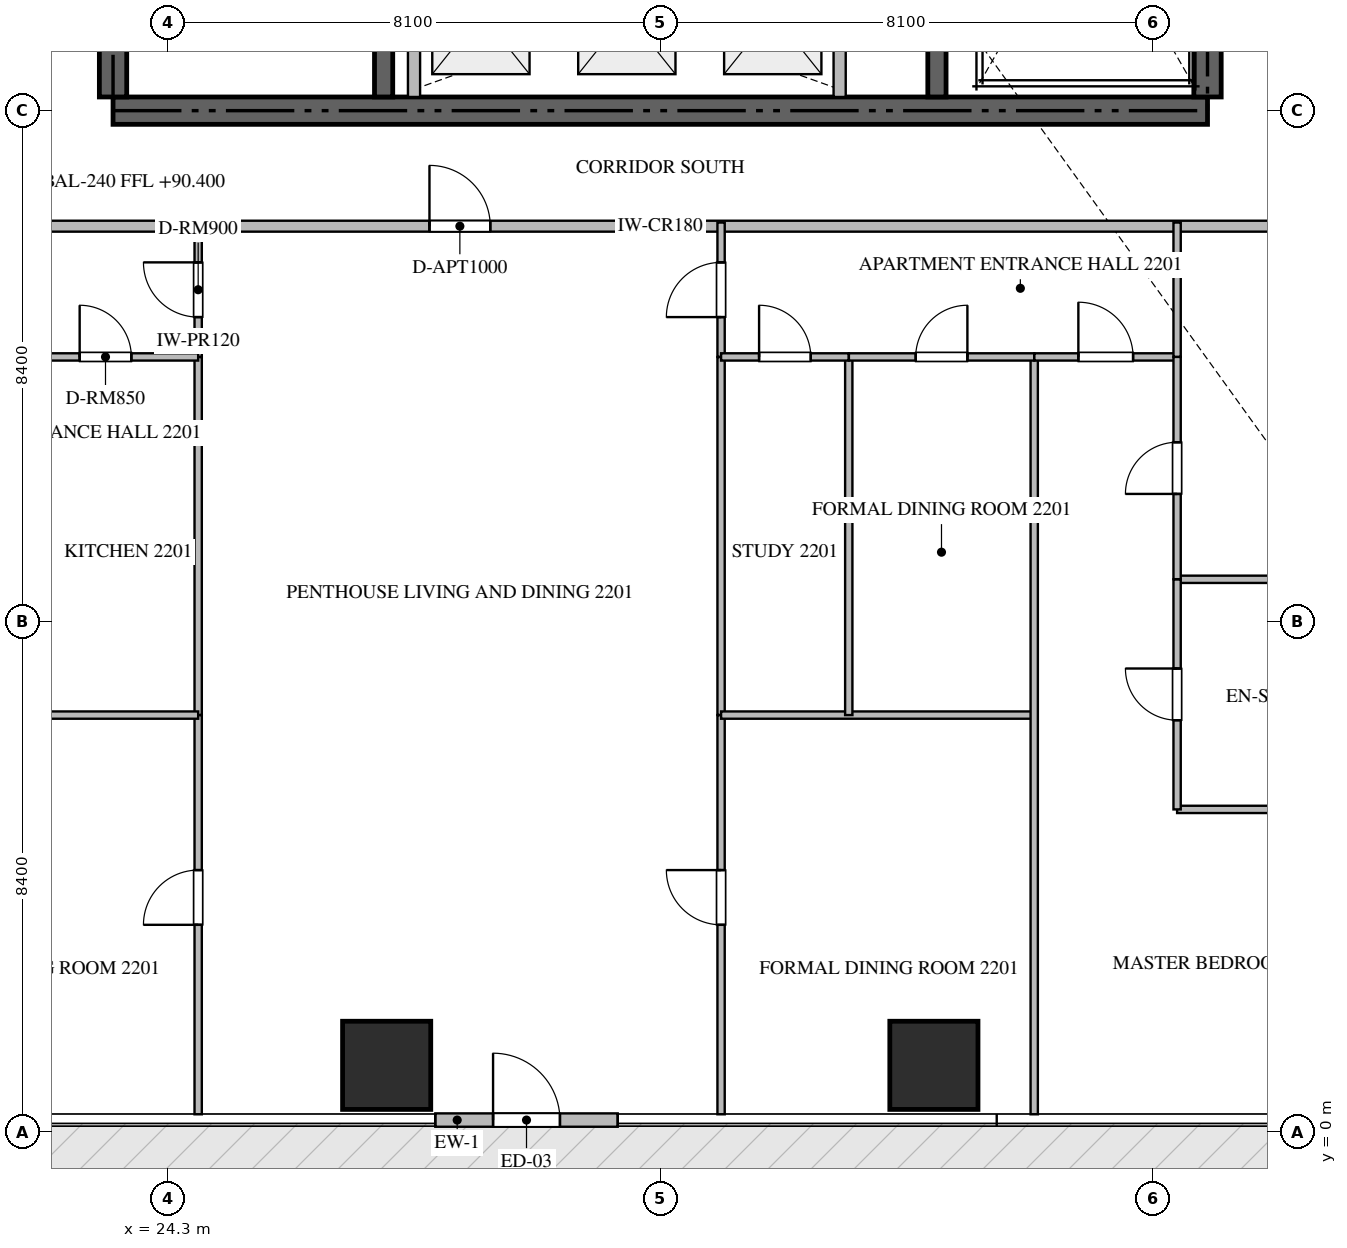
"""IFC4 building model, lengths in metres.
Left out: names, types, materials, properties, quantities, classifications, styles, units other than length and angle.
Written with IfcOpenShell. Run it as: python <this file> out.ifc"""

import sys

from ifc_helpers import new_model, si_unit, direction, frame, frame_2d, origin, origin_2d, place, context, subcontext, project, spatial, rectangle, extrude, source, transform, mapped, element, fill, save


model = new_model("IFC4")
c1 = context("Model", 3, precision=1e-05, world=origin(), true_north=direction((0.0, 1.0)))
c2 = subcontext(c1, "Body", "Model", "MODEL_VIEW")
j1 = project(units=[si_unit("LENGTHUNIT", "METRE"), si_unit("PLANEANGLEUNIT", "RADIAN")], contexts=[c1])
p1 = place(None, origin())
s1 = spatial("IfcSite", under=j1, at=p1, CompositionType="ELEMENT")
p2 = place(p1, origin())
s2 = spatial("IfcBuilding", under=s1, at=p2, CompositionType="ELEMENT")
p3 = place(p2, frame((0.0, 0.0, 90.45)))
s3 = spatial("IfcBuildingStorey", under=s2, at=p3, CompositionType="ELEMENT", Elevation=90.45)
p4 = place(p3, frame((23.4, 16.8, -0.26), z_axis=(0.0, 0.0, 1.0), x_axis=(1.0, 0.0, 0.0)))
e1 = element("IfcWall", 1, at=p4, inside=s3, PredefinedType="SHEAR", context=c2, shape_type="SweptSolid", body=[
    extrude(rectangle(XDim=18.0, YDim=0.45, at=frame_2d((9.0, 0.0))), origin(), (0.0, 0.0, 1.0), 3.748),
])
p5 = place(p3, frame((23.4, 17.025, -0.26), z_axis=(0.0, 0.0, 1.0), x_axis=(0.0, 1.0, 0.0)))
e2 = element("IfcWall", 2, at=p5, inside=s3, PredefinedType="SHEAR", context=c2, shape_type="SweptSolid", body=[
    extrude(rectangle(XDim=4.825, YDim=0.45, at=frame_2d((2.413, 0.0))), origin(), (0.0, 0.0, 1.0), 3.748),
])
p6 = place(p3, frame((41.4, 17.025, -0.26), z_axis=(0.0, 0.0, 1.0), x_axis=(0.0, 1.0, 0.0)))
e3 = element("IfcWall", 3, at=p6, inside=s3, PredefinedType="SHEAR", context=c2, shape_type="SweptSolid", body=[
    extrude(rectangle(XDim=8.325, YDim=0.45, at=frame_2d((4.163, 0.0))), origin(), (0.0, 0.0, 1.0), 3.748),
])
p7 = place(p3, frame((27.85, 17.025, -0.26), z_axis=(0.0, 0.0, 1.0), x_axis=(0.0, 1.0, 0.0)))
e4 = element("IfcWall", 4, at=p7, inside=s3, PredefinedType="SHEAR", context=c2, shape_type="SweptSolid", body=[
    extrude(rectangle(XDim=4.825, YDim=0.3, at=frame_2d((2.413, 0.0))), origin(), (0.0, 0.0, 1.0), 3.748),
])
p8 = place(p3, frame((36.95, 17.025, -0.26), z_axis=(0.0, 0.0, 1.0), x_axis=(0.0, 1.0, 0.0)))
e5 = element("IfcWall", 5, at=p8, inside=s3, PredefinedType="SHEAR", context=c2, shape_type="SweptSolid", body=[
    extrude(rectangle(XDim=8.325, YDim=0.3, at=frame_2d((4.163, 0.0))), origin(), (0.0, 0.0, 1.0), 3.748),
])
m1 = source(origin(), c2, "Body", "SweptSolid", [
    extrude(rectangle(XDim=1.45, YDim=1.45, at=origin_2d()), origin(), (0.0, 0.0, 1.0), 3.75),
])
for number, where, z_axis, x_axis in (
    (6, (27.9, 1.1, -0.26), (0.0, 0.0, 1.0), (1.0, 0.0, 0.0)),
    (7, (36.9, 1.1, -0.26), (0.0, 0.0, 1.0), (1.0, 0.0, 0.0)),
):
    element("IfcColumn", number, at=place(p3, frame(where, z_axis=z_axis, x_axis=x_axis)), inside=s3, PredefinedType="COLUMN", context=c2, shape_type="MappedRepresentation", body=[
        mapped(m1, transform((0.0, 0.0, 0.0), scale=1.0)),
    ])
p9 = place(p3, frame((28.7, 0.2, 0.0), z_axis=(0.0, 0.0, 1.0), x_axis=(1.0, 0.0, 0.0)))
e8 = element("IfcWall", 8, at=p9, inside=s3, PredefinedType="ELEMENTEDWALL", context=c2, shape_type="SweptSolid", body=[
    extrude(rectangle(XDim=3.0, YDim=0.22, at=frame_2d((1.5, 0.0))), origin(), (0.0, 0.0, 1.0), 3.475),
])
p10 = place(p9, frame((0.95, 0.0, 0.0)))
e9 = element("IfcOpeningElement", 9, at=p10, cuts=e8, PredefinedType="OPENING", context=c2, shape_type="SweptSolid", body=[
    extrude(rectangle(XDim=1.1, YDim=2.2, at=frame_2d((0.55, 1.1))), frame((0.0, 0.12, 0.0), z_axis=(0.0, -1.0, 0.0), x_axis=(1.0, 0.0, 0.0)), (0.0, 0.0, 1.0), 0.24),
])
for number, where, z_axis, x_axis in (
    (10, (28.35, 17.025, 0.0), (0.0, 0.0, 1.0), (0.0, 1.0, 0.0)),
    (11, (35.35, 17.025, 0.0), (0.0, 0.0, 1.0), (0.0, 1.0, 0.0)),
):
    element("IfcWall", number, at=place(p3, frame(where, z_axis=z_axis, x_axis=x_axis)), inside=s3, PredefinedType="STANDARD", context=c2, shape_type="SweptSolid", body=[
        extrude(rectangle(XDim=2.525, YDim=0.2, at=frame_2d((1.263, 0.0))), origin(), (0.0, 0.0, 1.0), 3.49),
    ])
p11 = place(p3, frame((21.402, 14.9, 0.0), z_axis=(0.0, 0.0, 1.0), x_axis=(1.0, 0.0, 0.0)))
e12 = element("IfcWall", 12, at=p11, inside=s3, PredefinedType="PARTITIONING", context=c2, shape_type="SweptSolid", body=[
    extrude(rectangle(XDim=21.996, YDim=0.18, at=frame_2d((10.998, 0.0))), origin(), (0.0, 0.0, 1.0), 3.49),
])
p12 = place(p11, frame((7.202, 0.0, 0.0)))
e13 = element("IfcOpeningElement", 13, at=p12, cuts=e12, PredefinedType="OPENING", context=c2, shape_type="SweptSolid", body=[
    extrude(rectangle(XDim=1.0, YDim=2.15, at=frame_2d((0.5, 1.075))), frame((0.0, 0.1, 0.0), z_axis=(0.0, -1.0, 0.0), x_axis=(1.0, 0.0, 0.0)), (0.0, 0.0, 1.0), 0.2),
])
p13 = place(p3, frame((24.8, 12.75, 0.0), z_axis=(0.0, 0.0, 1.0), x_axis=(0.0, 1.0, 0.0)))
e14 = element("IfcWall", 14, at=p13, inside=s3, PredefinedType="PARTITIONING", context=c2, shape_type="SweptSolid", body=[
    extrude(rectangle(XDim=2.21, YDim=0.12, at=frame_2d((1.105, 0.0))), origin(), (0.0, 0.0, 1.0), 3.49),
])
p14 = place(p13, frame((0.655, 0.0, 0.0)))
e15 = element("IfcOpeningElement", 15, at=p14, cuts=e14, PredefinedType="OPENING", context=c2, shape_type="SweptSolid", body=[
    extrude(rectangle(XDim=0.9, YDim=2.1, at=frame_2d((0.45, 1.05))), frame((0.0, 0.07, 0.0), z_axis=(0.0, -1.0, 0.0), x_axis=(1.0, 0.0, 0.0)), (0.0, 0.0, 1.0), 0.14),
])
p15 = place(p3, frame((24.8, 0.295, 0.0), z_axis=(0.0, 0.0, 1.0), x_axis=(0.0, 1.0, 0.0)))
e16 = element("IfcWall", 16, at=p15, inside=s3, PredefinedType="PARTITIONING", context=c2, shape_type="SweptSolid", body=[
    extrude(rectangle(XDim=6.565, YDim=0.12, at=frame_2d((3.283, 0.0))), origin(), (0.0, 0.0, 1.0), 3.49),
])
p16 = place(p15, frame((3.116, 0.0, 0.0)))
e17 = element("IfcOpeningElement", 17, at=p16, cuts=e16, PredefinedType="OPENING", context=c2, shape_type="SweptSolid", body=[
    extrude(rectangle(XDim=0.9, YDim=2.1, at=frame_2d((0.45, 1.05))), frame((0.0, 0.07, 0.0), z_axis=(0.0, -1.0, 0.0), x_axis=(1.0, 0.0, 0.0)), (0.0, 0.0, 1.0), 0.14),
])
p17 = place(p3, frame((24.8, 6.862, 0.0), z_axis=(0.0, 0.0, 1.0), x_axis=(0.0, 1.0, 0.0)))
e18 = element("IfcWall", 18, at=p17, inside=s3, PredefinedType="PARTITIONING", context=c2, shape_type="SweptSolid", body=[
    extrude(rectangle(XDim=5.886, YDim=0.12, at=frame_2d((2.943, 0.0))), origin(), (0.0, 0.0, 1.0), 3.49),
])
p18 = place(p3, frame((19.65, 6.86, 0.0), z_axis=(0.0, 0.0, 1.0), x_axis=(1.0, 0.0, 0.0)))
e19 = element("IfcWall", 19, at=p18, inside=s3, PredefinedType="PARTITIONING", context=c2, shape_type="SweptSolid", body=[
    extrude(rectangle(XDim=5.15, YDim=0.12, at=frame_2d((2.575, 0.0))), origin(), (0.0, 0.0, 1.0), 3.49),
])
p19 = place(p3, frame((21.752, 12.75, 0.0), z_axis=(0.0, 0.0, 1.0), x_axis=(1.0, 0.0, 0.0)))
e20 = element("IfcWall", 20, at=p19, inside=s3, PredefinedType="PARTITIONING", context=c2, shape_type="SweptSolid", body=[
    extrude(rectangle(XDim=3.048, YDim=0.12, at=frame_2d((1.524, 0.0))), origin(), (0.0, 0.0, 1.0), 3.49),
])
p20 = place(p19, frame((1.099, 0.0, 0.0)))
e21 = element("IfcOpeningElement", 21, at=p20, cuts=e20, PredefinedType="OPENING", context=c2, shape_type="SweptSolid", body=[
    extrude(rectangle(XDim=0.85, YDim=2.1, at=frame_2d((0.425, 1.05))), frame((0.0, 0.07, 0.0), z_axis=(0.0, -1.0, 0.0), x_axis=(1.0, 0.0, 0.0)), (0.0, 0.0, 1.0), 0.14),
])
p21 = place(p3, frame((33.4, 12.75, 0.0), z_axis=(0.0, 0.0, 1.0), x_axis=(0.0, 1.0, 0.0)))
e22 = element("IfcWall", 22, at=p21, inside=s3, PredefinedType="PARTITIONING", context=c2, shape_type="SweptSolid", body=[
    extrude(rectangle(XDim=2.21, YDim=0.12, at=frame_2d((1.105, 0.0))), origin(), (0.0, 0.0, 1.0), 3.49),
])
p22 = place(p21, frame((0.655, 0.0, 0.0)))
e23 = element("IfcOpeningElement", 23, at=p22, cuts=e22, PredefinedType="OPENING", context=c2, shape_type="SweptSolid", body=[
    extrude(rectangle(XDim=0.9, YDim=2.1, at=frame_2d((0.45, 1.05))), frame((0.0, 0.07, 0.0), z_axis=(0.0, -1.0, 0.0), x_axis=(1.0, 0.0, 0.0)), (0.0, 0.0, 1.0), 0.14),
])
p23 = place(p3, frame((33.4, 0.295, 0.0), z_axis=(0.0, 0.0, 1.0), x_axis=(0.0, 1.0, 0.0)))
e24 = element("IfcWall", 24, at=p23, inside=s3, PredefinedType="PARTITIONING", context=c2, shape_type="SweptSolid", body=[
    extrude(rectangle(XDim=6.565, YDim=0.12, at=frame_2d((3.283, 0.0))), origin(), (0.0, 0.0, 1.0), 3.49),
])
p24 = place(p23, frame((3.116, 0.0, 0.0)))
e25 = element("IfcOpeningElement", 25, at=p24, cuts=e24, PredefinedType="OPENING", context=c2, shape_type="SweptSolid", body=[
    extrude(rectangle(XDim=0.9, YDim=2.1, at=frame_2d((0.45, 1.05))), frame((0.0, 0.07, 0.0), z_axis=(0.0, -1.0, 0.0), x_axis=(1.0, 0.0, 0.0)), (0.0, 0.0, 1.0), 0.14),
])
p25 = place(p3, frame((33.4, 6.862, 0.0), z_axis=(0.0, 0.0, 1.0), x_axis=(0.0, 1.0, 0.0)))
e26 = element("IfcWall", 26, at=p25, inside=s3, PredefinedType="PARTITIONING", context=c2, shape_type="SweptSolid", body=[
    extrude(rectangle(XDim=5.886, YDim=0.12, at=frame_2d((2.943, 0.0))), origin(), (0.0, 0.0, 1.0), 3.49),
])
p26 = place(p3, frame((33.4, 6.86, 0.0), z_axis=(0.0, 0.0, 1.0), x_axis=(1.0, 0.0, 0.0)))
e27 = element("IfcWall", 27, at=p26, inside=s3, PredefinedType="PARTITIONING", context=c2, shape_type="SweptSolid", body=[
    extrude(rectangle(XDim=5.15, YDim=0.12, at=frame_2d((2.575, 0.0))), origin(), (0.0, 0.0, 1.0), 3.49),
])
p27 = place(p3, frame((38.55, 0.295, 0.0), z_axis=(0.0, 0.0, 1.0), x_axis=(0.0, 1.0, 0.0)))
e28 = element("IfcWall", 28, at=p27, inside=s3, PredefinedType="PARTITIONING", context=c2, shape_type="SweptSolid", body=[
    extrude(rectangle(XDim=12.455, YDim=0.12, at=frame_2d((6.228, 0.0))), origin(), (0.0, 0.0, 1.0), 3.49),
])
p28 = place(p3, frame((35.5, 6.86, 0.0), z_axis=(0.0, 0.0, 1.0), x_axis=(0.0, 1.0, 0.0)))
e29 = element("IfcWall", 29, at=p28, inside=s3, PredefinedType="PARTITIONING", context=c2, shape_type="SweptSolid", body=[
    extrude(rectangle(XDim=5.89, YDim=0.12, at=frame_2d((2.945, 0.0))), origin(), (0.0, 0.0, 1.0), 3.49),
])
p29 = place(p3, frame((33.4, 12.75, 0.0), z_axis=(0.0, 0.0, 1.0), x_axis=(1.0, 0.0, 0.0)))
e30 = element("IfcWall", 30, at=p29, inside=s3, PredefinedType="PARTITIONING", context=c2, shape_type="SweptSolid", body=[
    extrude(rectangle(XDim=2.1, YDim=0.12, at=frame_2d((1.05, 0.0))), origin(), (0.0, 0.0, 1.0), 3.49),
])
p30 = place(p29, frame((0.625, 0.0, 0.0)))
e31 = element("IfcOpeningElement", 31, at=p30, cuts=e30, PredefinedType="OPENING", context=c2, shape_type="SweptSolid", body=[
    extrude(rectangle(XDim=0.85, YDim=2.1, at=frame_2d((0.425, 1.05))), frame((0.0, 0.07, 0.0), z_axis=(0.0, -1.0, 0.0), x_axis=(1.0, 0.0, 0.0)), (0.0, 0.0, 1.0), 0.14),
])
p31 = place(p3, frame((35.502, 12.75, 0.0), z_axis=(0.0, 0.0, 1.0), x_axis=(1.0, 0.0, 0.0)))
e32 = element("IfcWall", 32, at=p31, inside=s3, PredefinedType="PARTITIONING", context=c2, shape_type="SweptSolid", body=[
    extrude(rectangle(XDim=3.048, YDim=0.12, at=frame_2d((1.524, 0.0))), origin(), (0.0, 0.0, 1.0), 3.49),
])
p32 = place(p31, frame((1.099, 0.0, 0.0)))
e33 = element("IfcOpeningElement", 33, at=p32, cuts=e32, PredefinedType="OPENING", context=c2, shape_type="SweptSolid", body=[
    extrude(rectangle(XDim=0.85, YDim=2.1, at=frame_2d((0.425, 1.05))), frame((0.0, 0.07, 0.0), z_axis=(0.0, -1.0, 0.0), x_axis=(1.0, 0.0, 0.0)), (0.0, 0.0, 1.0), 0.14),
])
p33 = place(p3, frame((38.552, 12.75, 0.0), z_axis=(0.0, 0.0, 1.0), x_axis=(1.0, 0.0, 0.0)))
e34 = element("IfcWall", 34, at=p33, inside=s3, PredefinedType="PARTITIONING", context=c2, shape_type="SweptSolid", body=[
    extrude(rectangle(XDim=2.348, YDim=0.12, at=frame_2d((1.174, 0.0))), origin(), (0.0, 0.0, 1.0), 3.49),
])
p34 = place(p33, frame((0.724, 0.0, 0.0)))
e35 = element("IfcOpeningElement", 35, at=p34, cuts=e34, PredefinedType="OPENING", context=c2, shape_type="SweptSolid", body=[
    extrude(rectangle(XDim=0.9, YDim=2.1, at=frame_2d((0.45, 1.05))), frame((0.0, 0.07, 0.0), z_axis=(0.0, -1.0, 0.0), x_axis=(1.0, 0.0, 0.0)), (0.0, 0.0, 1.0), 0.14),
])
for number, where, z_axis, x_axis in (
    (36, (40.9, 5.309, 0.0), (0.0, 0.0, 1.0), (1.0, 0.0, 0.0)),
    (37, (40.9, 9.093, 0.0), (0.0, 0.0, 1.0), (1.0, 0.0, 0.0)),
):
    element("IfcWall", number, at=place(p3, frame(where, z_axis=z_axis, x_axis=x_axis)), inside=s3, PredefinedType="PARTITIONING", context=c2, shape_type="SweptSolid", body=[
        extrude(rectangle(XDim=3.7, YDim=0.12, at=frame_2d((1.85, 0.0))), origin(), (0.0, 0.0, 1.0), 3.49),
    ])
p35 = place(p3, frame((40.9, 5.309, 0.0), z_axis=(0.0, 0.0, 1.0), x_axis=(0.0, 1.0, 0.0)))
e38 = element("IfcWall", 38, at=p35, inside=s3, PredefinedType="PARTITIONING", context=c2, shape_type="SweptSolid", body=[
    extrude(rectangle(XDim=3.784, YDim=0.12, at=frame_2d((1.892, 0.0))), origin(), (0.0, 0.0, 1.0), 3.49),
])
p36 = place(p35, frame((1.467, 0.0, 0.0)))
e39 = element("IfcOpeningElement", 39, at=p36, cuts=e38, PredefinedType="OPENING", context=c2, shape_type="SweptSolid", body=[
    extrude(rectangle(XDim=0.85, YDim=2.1, at=frame_2d((0.425, 1.05))), frame((0.0, 0.07, 0.0), z_axis=(0.0, -1.0, 0.0), x_axis=(1.0, 0.0, 0.0)), (0.0, 0.0, 1.0), 0.14),
])
p37 = place(p3, frame((40.9, 9.095, 0.0), z_axis=(0.0, 0.0, 1.0), x_axis=(0.0, 1.0, 0.0)))
e40 = element("IfcWall", 40, at=p37, inside=s3, PredefinedType="PARTITIONING", context=c2, shape_type="SweptSolid", body=[
    extrude(rectangle(XDim=3.655, YDim=0.12, at=frame_2d((1.828, 0.0))), origin(), (0.0, 0.0, 1.0), 3.49),
])
p38 = place(p37, frame((1.402, 0.0, 0.0)))
e41 = element("IfcOpeningElement", 41, at=p38, cuts=e40, PredefinedType="OPENING", context=c2, shape_type="SweptSolid", body=[
    extrude(rectangle(XDim=0.85, YDim=2.1, at=frame_2d((0.425, 1.05))), frame((0.0, 0.07, 0.0), z_axis=(0.0, -1.0, 0.0), x_axis=(1.0, 0.0, 0.0)), (0.0, 0.0, 1.0), 0.14),
])
p39 = place(p3, frame((40.9, 12.752, 0.0), z_axis=(0.0, 0.0, 1.0), x_axis=(0.0, 1.0, 0.0)))
e42 = element("IfcWall", 42, at=p39, inside=s3, PredefinedType="PARTITIONING", context=c2, shape_type="SweptSolid", body=[
    extrude(rectangle(XDim=2.208, YDim=0.12, at=frame_2d((1.104, 0.0))), origin(), (0.0, 0.0, 1.0), 3.49),
])
m2 = source(origin(), c2, "Body", "SweptSolid", [
    extrude(rectangle(XDim=1.1, YDim=2.2, at=frame_2d((0.55, 1.1))), frame((0.0, 0.025, 0.0), z_axis=(0.0, -1.0, 0.0), x_axis=(1.0, 0.0, 0.0)), (0.0, 0.0, 1.0), 0.05),
])
p40 = place(p10, origin())
e43 = element("IfcDoor", 43, at=p40, inside=s3, OperationType="SINGLE_SWING_LEFT", PredefinedType="DOOR", context=c2, shape_type="MappedRepresentation", body=[
    mapped(m2, transform((0.0, 0.0, 0.0), scale=1.0)),
])
fill(e9, e43)
m3 = source(origin(), c2, "Body", "SweptSolid", [
    extrude(rectangle(XDim=1.0, YDim=2.15, at=frame_2d((0.5, 1.075))), frame((0.0, 0.025, 0.0), z_axis=(0.0, -1.0, 0.0), x_axis=(1.0, 0.0, 0.0)), (0.0, 0.0, 1.0), 0.05),
])
p41 = place(p12, origin())
e44 = element("IfcDoor", 44, at=p41, inside=s3, OperationType="SINGLE_SWING_LEFT", PredefinedType="DOOR", context=c2, shape_type="MappedRepresentation", body=[
    mapped(m3, transform((0.0, 0.0, 0.0), scale=1.0)),
])
fill(e13, e44)
m4 = source(origin(), c2, "Body", "SweptSolid", [
    extrude(rectangle(XDim=0.9, YDim=2.1, at=frame_2d((0.45, 1.05))), frame((0.0, 0.025, 0.0), z_axis=(0.0, -1.0, 0.0), x_axis=(1.0, 0.0, 0.0)), (0.0, 0.0, 1.0), 0.05),
])
p42 = place(p14, origin())
e45 = element("IfcDoor", 45, at=p42, inside=s3, OperationType="SINGLE_SWING_RIGHT", PredefinedType="DOOR", context=c2, shape_type="MappedRepresentation", body=[
    mapped(m4, transform((0.0, 0.0, 0.0), scale=1.0)),
])
fill(e15, e45)
p43 = place(p16, origin())
e46 = element("IfcDoor", 46, at=p43, inside=s3, OperationType="SINGLE_SWING_LEFT", PredefinedType="DOOR", context=c2, shape_type="MappedRepresentation", body=[
    mapped(m4, transform((0.0, 0.0, 0.0), scale=1.0)),
])
fill(e17, e46)
m5 = source(origin(), c2, "Body", "SweptSolid", [
    extrude(rectangle(XDim=0.85, YDim=2.1, at=frame_2d((0.425, 1.05))), frame((0.0, 0.025, 0.0), z_axis=(0.0, -1.0, 0.0), x_axis=(1.0, 0.0, 0.0)), (0.0, 0.0, 1.0), 0.05),
])
p44 = place(p20, origin())
e47 = element("IfcDoor", 47, at=p44, inside=s3, OperationType="SINGLE_SWING_LEFT", PredefinedType="DOOR", context=c2, shape_type="MappedRepresentation", body=[
    mapped(m5, transform((0.0, 0.0, 0.0), scale=1.0)),
])
fill(e21, e47)
p45 = place(p22, origin())
e48 = element("IfcDoor", 48, at=p45, inside=s3, OperationType="SINGLE_SWING_LEFT", PredefinedType="DOOR", context=c2, shape_type="MappedRepresentation", body=[
    mapped(m4, transform((0.0, 0.0, 0.0), scale=1.0)),
])
fill(e23, e48)
p46 = place(p24, origin())
e49 = element("IfcDoor", 49, at=p46, inside=s3, OperationType="SINGLE_SWING_RIGHT", PredefinedType="DOOR", context=c2, shape_type="MappedRepresentation", body=[
    mapped(m4, transform((0.0, 0.0, 0.0), scale=1.0)),
])
fill(e25, e49)
p47 = place(p30, origin())
e50 = element("IfcDoor", 50, at=p47, inside=s3, OperationType="SINGLE_SWING_LEFT", PredefinedType="DOOR", context=c2, shape_type="MappedRepresentation", body=[
    mapped(m5, transform((0.0, 0.0, 0.0), scale=1.0)),
])
fill(e31, e50)
p48 = place(p32, origin())
e51 = element("IfcDoor", 51, at=p48, inside=s3, OperationType="SINGLE_SWING_RIGHT", PredefinedType="DOOR", context=c2, shape_type="MappedRepresentation", body=[
    mapped(m5, transform((0.0, 0.0, 0.0), scale=1.0)),
])
fill(e33, e51)
p49 = place(p34, origin())
e52 = element("IfcDoor", 52, at=p49, inside=s3, OperationType="SINGLE_SWING_LEFT", PredefinedType="DOOR", context=c2, shape_type="MappedRepresentation", body=[
    mapped(m4, transform((0.0, 0.0, 0.0), scale=1.0)),
])
fill(e35, e52)
p50 = place(p36, origin())
e53 = element("IfcDoor", 53, at=p50, inside=s3, OperationType="SINGLE_SWING_RIGHT", PredefinedType="DOOR", context=c2, shape_type="MappedRepresentation", body=[
    mapped(m5, transform((0.0, 0.0, 0.0), scale=1.0)),
])
fill(e39, e53)
p51 = place(p38, origin())
e54 = element("IfcDoor", 54, at=p51, inside=s3, OperationType="SINGLE_SWING_LEFT", PredefinedType="DOOR", context=c2, shape_type="MappedRepresentation", body=[
    mapped(m5, transform((0.0, 0.0, 0.0), scale=1.0)),
])
fill(e41, e54)
save(model, sys.argv[1])
